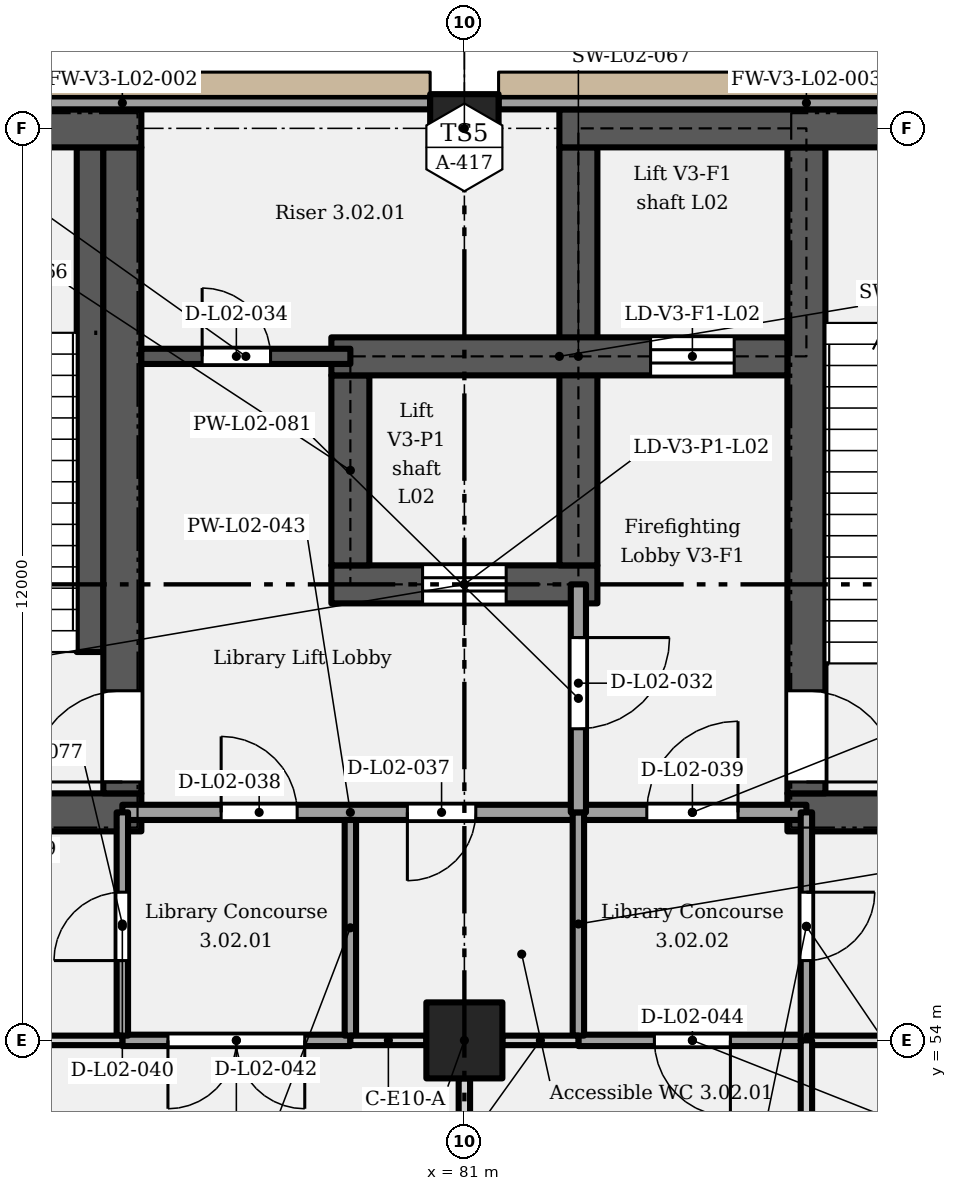
"""IFC4 building model, lengths in metres.
Left out: names, types, materials, properties, quantities, classifications, styles, units other than length and angle.
Written with IfcOpenShell. Run it as: python <this file> out.ifc"""

import sys

from ifc_helpers import new_model, si_unit, direction, frame, frame_2d, origin, origin_2d, place, context, subcontext, project, spatial, rectangle, extrude, element, fill, save


model = new_model("IFC4")
c1 = context("Model", 3, precision=1e-05, world=origin(), true_north=direction((0.0, 1.0)))
c2 = subcontext(c1, "Body", "Model", "MODEL_VIEW")
j1 = project(units=[si_unit("LENGTHUNIT", "METRE"), si_unit("PLANEANGLEUNIT", "RADIAN")], contexts=[c1])
p1 = place(None, origin())
s1 = spatial("IfcSite", under=j1, at=p1, CompositionType="ELEMENT")
p2 = place(p1, origin())
s2 = spatial("IfcBuilding", under=s1, at=p2, CompositionType="ELEMENT")
p3 = place(p2, frame((0.0, 0.0, 12.0)))
s3 = spatial("IfcBuildingStorey", under=s2, at=p3, CompositionType="ELEMENT", Elevation=12.0)
p4 = place(p3, frame((81.0, 54.0, 0.0), z_axis=(0.0, 0.0, 1.0), x_axis=(1.0, 0.0, 0.0)))
e1 = element("IfcColumn", 1, at=p4, inside=s3, PredefinedType="COLUMN", context=c2, shape_type="SweptSolid", body=[
    extrude(rectangle(XDim=1.0, YDim=1.0, at=origin_2d()), origin(), (0.0, 0.0, 1.0), 5.4),
])
p5 = place(p3, frame((81.0, 66.0, 0.0), z_axis=(0.0, 0.0, 1.0), x_axis=(1.0, 0.0, 0.0)))
e2 = element("IfcColumn", 2, at=p5, inside=s3, PredefinedType="COLUMN", context=c2, shape_type="SweptSolid", body=[
    extrude(rectangle(XDim=0.9, YDim=0.9, at=origin_2d()), origin(), (0.0, 0.0, 1.0), 5.4),
])
for number, where, z_axis, x_axis in (
    (3, (71.75, 57.0, 0.0), (0.0, 0.0, 1.0), (1.0, 0.0, 0.0)),
    (4, (85.25, 57.0, 0.0), (0.0, 0.0, 1.0), (1.0, 0.0, 0.0)),
):
    element("IfcWall", number, at=place(p3, frame(where, z_axis=z_axis, x_axis=x_axis)), inside=s3, PredefinedType="SHEAR", context=c2, shape_type="SweptSolid", body=[
        extrude(rectangle(XDim=5.0, YDim=0.5, at=frame_2d((2.5, 0.0))), origin(), (0.0, 0.0, 1.0), 5.15),
    ])
p6 = place(p3, frame((76.5, 57.25, 0.0), z_axis=(0.0, 0.0, 1.0), x_axis=(0.0, 1.0, 0.0)))
e5 = element("IfcWall", 5, at=p6, inside=s3, PredefinedType="SHEAR", context=c2, shape_type="SweptSolid", body=[
    extrude(rectangle(XDim=8.5, YDim=0.5, at=frame_2d((4.25, 0.0))), origin(), (0.0, 0.0, 1.0), 5.15),
])
p7 = place(p6, frame((0.15, 0.0, 0.0)))
e6 = element("IfcOpeningElement", 6, at=p7, cuts=e5, PredefinedType="OPENING", context=c2, shape_type="SweptSolid", body=[
    extrude(rectangle(XDim=1.2, YDim=2.1, at=frame_2d((0.6, 1.05))), frame((0.0, 0.26, 0.0), z_axis=(0.0, -1.0, 0.0), x_axis=(1.0, 0.0, 0.0)), (0.0, 0.0, 1.0), 0.52),
])
p8 = place(p3, frame((85.5, 57.25, 0.0), z_axis=(0.0, 0.0, 1.0), x_axis=(0.0, 1.0, 0.0)))
e7 = element("IfcWall", 7, at=p8, inside=s3, PredefinedType="SHEAR", context=c2, shape_type="SweptSolid", body=[
    extrude(rectangle(XDim=8.5, YDim=0.5, at=frame_2d((4.25, 0.0))), origin(), (0.0, 0.0, 1.0), 5.15),
])
p9 = place(p8, frame((1.35, 0.0, 0.0), z_axis=(0.0, 0.0, 1.0), x_axis=(-1.0, 0.0, 0.0)))
e8 = element("IfcOpeningElement", 8, at=p9, cuts=e7, PredefinedType="OPENING", context=c2, shape_type="SweptSolid", body=[
    extrude(rectangle(XDim=1.2, YDim=2.1, at=frame_2d((0.6, 1.05))), frame((0.0, 0.26, 0.0), z_axis=(0.0, -1.0, 0.0), x_axis=(1.0, 0.0, 0.0)), (0.0, 0.0, 1.0), 0.52),
])
p10 = place(p3, frame((79.25, 60.0, 0.0), z_axis=(0.0, 0.0, 1.0), x_axis=(1.0, 0.0, 0.0)))
e9 = element("IfcWall", 9, at=p10, inside=s3, PredefinedType="SHEAR", context=c2, shape_type="SweptSolid", body=[
    extrude(rectangle(XDim=3.5, YDim=0.5, at=frame_2d((1.75, 0.0))), origin(), (0.0, 0.0, 1.0), 5.15),
])
p11 = place(p10, frame((1.2, 0.0, 0.0)))
e10 = element("IfcOpeningElement", 10, at=p11, cuts=e9, PredefinedType="OPENING", context=c2, shape_type="SweptSolid", body=[
    extrude(rectangle(XDim=1.1, YDim=2.1, at=frame_2d((0.55, 1.05))), frame((0.0, 0.26, 0.0), z_axis=(0.0, -1.0, 0.0), x_axis=(1.0, 0.0, 0.0)), (0.0, 0.0, 1.0), 0.52),
])
p12 = place(p3, frame((79.5, 60.25, 0.0), z_axis=(0.0, 0.0, 1.0), x_axis=(0.0, 1.0, 0.0)))
e11 = element("IfcWall", 11, at=p12, inside=s3, PredefinedType="SHEAR", context=c2, shape_type="SweptSolid", body=[
    extrude(rectangle(XDim=2.5, YDim=0.5, at=frame_2d((1.25, 0.0))), origin(), (0.0, 0.0, 1.0), 5.15),
])
p13 = place(p3, frame((82.5, 60.25, 0.0), z_axis=(0.0, 0.0, 1.0), x_axis=(0.0, 1.0, 0.0)))
e12 = element("IfcWall", 12, at=p13, inside=s3, PredefinedType="SHEAR", context=c2, shape_type="SweptSolid", body=[
    extrude(rectangle(XDim=5.5, YDim=0.5, at=frame_2d((2.75, 0.0))), origin(), (0.0, 0.0, 1.0), 5.15),
])
p14 = place(p3, frame((79.25, 63.0, 0.0), z_axis=(0.0, 0.0, 1.0), x_axis=(1.0, 0.0, 0.0)))
e13 = element("IfcWall", 13, at=p14, inside=s3, PredefinedType="SHEAR", context=c2, shape_type="SweptSolid", body=[
    extrude(rectangle(XDim=6.0, YDim=0.5, at=frame_2d((3.0, 0.0))), origin(), (0.0, 0.0, 1.0), 5.15),
])
p15 = place(p14, frame((4.2, 0.0, 0.0)))
e14 = element("IfcOpeningElement", 14, at=p15, cuts=e13, PredefinedType="OPENING", context=c2, shape_type="SweptSolid", body=[
    extrude(rectangle(XDim=1.1, YDim=2.1, at=frame_2d((0.55, 1.05))), frame((0.0, 0.26, 0.0), z_axis=(0.0, -1.0, 0.0), x_axis=(1.0, 0.0, 0.0)), (0.0, 0.0, 1.0), 0.52),
])
p16 = place(p3, frame((72.45, 66.0, 0.0), z_axis=(0.0, 0.0, 1.0), x_axis=(1.0, 0.0, 0.0)))
e15 = element("IfcWall", 15, at=p16, inside=s3, PredefinedType="SHEAR", context=c2, shape_type="SweptSolid", body=[
    extrude(rectangle(XDim=4.3, YDim=0.5, at=frame_2d((2.15, 0.0))), origin(), (0.0, 0.0, 1.0), 5.15),
])
p17 = place(p3, frame((82.25, 66.0, 0.0), z_axis=(0.0, 0.0, 1.0), x_axis=(1.0, 0.0, 0.0)))
e16 = element("IfcWall", 16, at=p17, inside=s3, PredefinedType="SHEAR", context=c2, shape_type="SweptSolid", body=[
    extrude(rectangle(XDim=7.3, YDim=0.5, at=frame_2d((3.65, 0.0))), origin(), (0.0, 0.0, 1.0), 5.15),
])
for number, where, z_axis, x_axis in (
    (17, (72.45, 66.335, 0.0), (0.0, 0.0, 1.0), (1.0, 0.0, 0.0)),
    (18, (81.45, 66.335, 0.0), (0.0, 0.0, 1.0), (1.0, 0.0, 0.0)),
):
    element("IfcWall", number, at=place(p3, frame(where, z_axis=z_axis, x_axis=x_axis)), inside=s3, PredefinedType="SOLIDWALL", context=c2, shape_type="SweptSolid", body=[
        extrude(rectangle(XDim=8.1, YDim=0.17, at=frame_2d((4.05, 0.0))), origin(), (0.0, 0.0, 1.0), 5.15),
    ])
p18 = place(p3, frame((72.5, 54.0, 0.0), z_axis=(0.0, 0.0, 1.0), x_axis=(1.0, 0.0, 0.0)))
e19 = element("IfcWall", 19, at=p18, inside=s3, PredefinedType="PARTITIONING", context=c2, shape_type="SweptSolid", body=[
    extrude(rectangle(XDim=4.0, YDim=0.125, at=frame_2d((2.0, 0.0))), origin(), (0.0, 0.0, 1.0), 4.4),
])
p19 = place(p3, frame((76.5, 54.0, 0.0), z_axis=(0.0, 0.0, 1.0), x_axis=(1.0, 0.0, 0.0)))
e20 = element("IfcWall", 20, at=p19, inside=s3, PredefinedType="PARTITIONING", context=c2, shape_type="SweptSolid", body=[
    extrude(rectangle(XDim=3.0, YDim=0.15, at=frame_2d((1.5, 0.0))), origin(), (0.0, 0.0, 1.0), 4.4),
])
p20 = place(p19, frame((2.4, 0.0, 0.0), z_axis=(0.0, 0.0, 1.0), x_axis=(-1.0, 0.0, 0.0)))
e21 = element("IfcOpeningElement", 21, at=p20, cuts=e20, PredefinedType="OPENING", context=c2, shape_type="SweptSolid", body=[
    extrude(rectangle(XDim=1.8, YDim=2.4, at=frame_2d((0.9, 1.2))), frame((0.0, 0.085, 0.0), z_axis=(0.0, -1.0, 0.0), x_axis=(1.0, 0.0, 0.0)), (0.0, 0.0, 1.0), 0.17),
])
for number, where, z_axis, x_axis in (
    (22, (79.5, 54.0, 0.0), (0.0, 0.0, 1.0), (1.0, 0.0, 0.0)),
    (23, (81.5, 54.0, 0.0), (0.0, 0.0, 1.0), (1.0, 0.0, 0.0)),
):
    element("IfcWall", number, at=place(p3, frame(where, z_axis=z_axis, x_axis=x_axis)), inside=s3, PredefinedType="PARTITIONING", context=c2, shape_type="SweptSolid", body=[
        extrude(rectangle(XDim=1.0, YDim=0.125, at=frame_2d((0.5, 0.0))), origin(), (0.0, 0.0, 1.0), 4.4),
    ])
p21 = place(p3, frame((82.5, 54.0, 0.0), z_axis=(0.0, 0.0, 1.0), x_axis=(1.0, 0.0, 0.0)))
e24 = element("IfcWall", 24, at=p21, inside=s3, PredefinedType="PARTITIONING", context=c2, shape_type="SweptSolid", body=[
    extrude(rectangle(XDim=3.0, YDim=0.15, at=frame_2d((1.5, 0.0))), origin(), (0.0, 0.0, 1.0), 4.4),
])
p22 = place(p21, frame((2.0, 0.0, 0.0), z_axis=(0.0, 0.0, 1.0), x_axis=(-1.0, 0.0, 0.0)))
e25 = element("IfcOpeningElement", 25, at=p22, cuts=e24, PredefinedType="OPENING", context=c2, shape_type="SweptSolid", body=[
    extrude(rectangle(XDim=1.0, YDim=2.1, at=frame_2d((0.5, 1.05))), frame((0.0, 0.085, 0.0), z_axis=(0.0, -1.0, 0.0), x_axis=(1.0, 0.0, 0.0)), (0.0, 0.0, 1.0), 0.17),
])
p23 = place(p3, frame((85.5, 54.0, 0.0), z_axis=(0.0, 0.0, 1.0), x_axis=(1.0, 0.0, 0.0)))
e26 = element("IfcWall", 26, at=p23, inside=s3, PredefinedType="PARTITIONING", context=c2, shape_type="SweptSolid", body=[
    extrude(rectangle(XDim=4.05, YDim=0.125, at=frame_2d((2.025, 0.0))), origin(), (0.0, 0.0, 1.0), 4.4),
])
p24 = place(p3, frame((76.5, 57.0, 0.0), z_axis=(0.0, 0.0, 1.0), x_axis=(1.0, 0.0, 0.0)))
e27 = element("IfcWall", 27, at=p24, inside=s3, PredefinedType="PARTITIONING", context=c2, shape_type="SweptSolid", body=[
    extrude(rectangle(XDim=6.0, YDim=0.2, at=frame_2d((3.0, 0.0))), origin(), (0.0, 0.0, 1.0), 5.15),
])
p25 = place(p24, frame((4.65, 0.0, 0.0), z_axis=(0.0, 0.0, 1.0), x_axis=(-1.0, 0.0, 0.0)))
e28 = element("IfcOpeningElement", 28, at=p25, cuts=e27, PredefinedType="OPENING", context=c2, shape_type="SweptSolid", body=[
    extrude(rectangle(XDim=0.9, YDim=2.1, at=frame_2d((0.45, 1.05))), frame((0.0, 0.11, 0.0), z_axis=(0.0, -1.0, 0.0), x_axis=(1.0, 0.0, 0.0)), (0.0, 0.0, 1.0), 0.22),
])
p26 = place(p24, frame((1.3, 0.0, 0.0)))
e29 = element("IfcOpeningElement", 29, at=p26, cuts=e27, PredefinedType="OPENING", context=c2, shape_type="SweptSolid", body=[
    extrude(rectangle(XDim=1.0, YDim=2.1, at=frame_2d((0.5, 1.05))), frame((0.0, 0.11, 0.0), z_axis=(0.0, -1.0, 0.0), x_axis=(1.0, 0.0, 0.0)), (0.0, 0.0, 1.0), 0.22),
])
p27 = place(p3, frame((82.5, 57.0, 0.0), z_axis=(0.0, 0.0, 1.0), x_axis=(1.0, 0.0, 0.0)))
e30 = element("IfcWall", 30, at=p27, inside=s3, PredefinedType="PARTITIONING", context=c2, shape_type="SweptSolid", body=[
    extrude(rectangle(XDim=3.0, YDim=0.2, at=frame_2d((1.5, 0.0))), origin(), (0.0, 0.0, 1.0), 5.15),
])
p28 = place(p27, frame((0.9, 0.0, 0.0)))
e31 = element("IfcOpeningElement", 31, at=p28, cuts=e30, PredefinedType="OPENING", context=c2, shape_type="SweptSolid", body=[
    extrude(rectangle(XDim=1.2, YDim=2.1, at=frame_2d((0.6, 1.05))), frame((0.0, 0.11, 0.0), z_axis=(0.0, -1.0, 0.0), x_axis=(1.0, 0.0, 0.0)), (0.0, 0.0, 1.0), 0.22),
])
p29 = place(p3, frame((76.75, 63.0, 0.0), z_axis=(0.0, 0.0, 1.0), x_axis=(1.0, 0.0, 0.0)))
e32 = element("IfcWall", 32, at=p29, inside=s3, PredefinedType="SHEAR", context=c2, shape_type="SweptSolid", body=[
    extrude(rectangle(XDim=2.75, YDim=0.2, at=frame_2d((1.375, 0.0))), origin(), (0.0, 0.0, 1.0), 5.15),
])
p30 = place(p29, frame((0.8, 0.0, 0.0)))
e33 = element("IfcOpeningElement", 33, at=p30, cuts=e32, PredefinedType="OPENING", context=c2, shape_type="SweptSolid", body=[
    extrude(rectangle(XDim=0.9, YDim=2.0, at=frame_2d((0.45, 1.0))), frame((0.0, 0.11, 0.0), z_axis=(0.0, -1.0, 0.0), x_axis=(1.0, 0.0, 0.0)), (0.0, 0.0, 1.0), 0.22),
])
p31 = place(p3, frame((76.5, 54.062, 0.0), z_axis=(0.0, 0.0, 1.0), x_axis=(0.0, 1.0, 0.0)))
e34 = element("IfcWall", 34, at=p31, inside=s3, PredefinedType="PARTITIONING", context=c2, shape_type="SweptSolid", body=[
    extrude(rectangle(XDim=2.938, YDim=0.15, at=frame_2d((1.469, 0.0))), origin(), (0.0, 0.0, 1.0), 5.15),
])
p32 = place(p31, frame((0.988, 0.0, 0.0)))
e35 = element("IfcOpeningElement", 35, at=p32, cuts=e34, PredefinedType="OPENING", context=c2, shape_type="SweptSolid", body=[
    extrude(rectangle(XDim=0.9, YDim=2.1, at=frame_2d((0.45, 1.05))), frame((0.0, 0.085, 0.0), z_axis=(0.0, -1.0, 0.0), x_axis=(1.0, 0.0, 0.0)), (0.0, 0.0, 1.0), 0.17),
])
p33 = place(p3, frame((79.5, 54.062, 0.0), z_axis=(0.0, 0.0, 1.0), x_axis=(0.0, 1.0, 0.0)))
e36 = element("IfcWall", 36, at=p33, inside=s3, PredefinedType="PARTITIONING", context=c2, shape_type="SweptSolid", body=[
    extrude(rectangle(XDim=2.837, YDim=0.15, at=frame_2d((1.419, 0.0))), origin(), (0.0, 0.0, 1.0), 5.15),
])
p34 = place(p3, frame((81.0, 38.0, 0.0), z_axis=(0.0, 0.0, 1.0), x_axis=(0.0, 1.0, 0.0)))
e37 = element("IfcWall", 37, at=p34, inside=s3, PredefinedType="PARTITIONING", context=c2, shape_type="SweptSolid", body=[
    extrude(rectangle(XDim=15.5, YDim=0.15, at=frame_2d((7.75, 0.0))), origin(), (0.0, 0.0, 1.0), 4.2),
])
p35 = place(p3, frame((82.5, 54.062, 0.0), z_axis=(0.0, 0.0, 1.0), x_axis=(0.0, 1.0, 0.0)))
e38 = element("IfcWall", 38, at=p35, inside=s3, PredefinedType="PARTITIONING", context=c2, shape_type="SweptSolid", body=[
    extrude(rectangle(XDim=2.938, YDim=0.15, at=frame_2d((1.469, 0.0))), origin(), (0.0, 0.0, 1.0), 5.15),
])
p36 = place(p3, frame((82.5, 57.0, 0.0), z_axis=(0.0, 0.0, 1.0), x_axis=(0.0, 1.0, 0.0)))
e39 = element("IfcWall", 39, at=p36, inside=s3, PredefinedType="PARTITIONING", context=c2, shape_type="SweptSolid", body=[
    extrude(rectangle(XDim=3.0, YDim=0.2, at=frame_2d((1.5, 0.0))), origin(), (0.0, 0.0, 1.0), 5.15),
])
p37 = place(p36, frame((2.3, 0.0, 0.0), z_axis=(0.0, 0.0, 1.0), x_axis=(-1.0, 0.0, 0.0)))
e40 = element("IfcOpeningElement", 40, at=p37, cuts=e39, PredefinedType="OPENING", context=c2, shape_type="SweptSolid", body=[
    extrude(rectangle(XDim=1.2, YDim=2.1, at=frame_2d((0.6, 1.05))), frame((0.0, 0.11, 0.0), z_axis=(0.0, -1.0, 0.0), x_axis=(1.0, 0.0, 0.0)), (0.0, 0.0, 1.0), 0.22),
])
p38 = place(p3, frame((85.5, 49.575, 0.0), z_axis=(0.0, 0.0, 1.0), x_axis=(0.0, 1.0, 0.0)))
e41 = element("IfcWall", 41, at=p38, inside=s3, PredefinedType="PARTITIONING", context=c2, shape_type="SweptSolid", body=[
    extrude(rectangle(XDim=4.425, YDim=0.15, at=frame_2d((2.212, 0.0))), origin(), (0.0, 0.0, 1.0), 5.15),
])
p39 = place(p38, frame((2.625, 0.0, 0.0), z_axis=(0.0, 0.0, 1.0), x_axis=(-1.0, 0.0, 0.0)))
e42 = element("IfcOpeningElement", 42, at=p39, cuts=e41, PredefinedType="OPENING", context=c2, shape_type="SweptSolid", body=[
    extrude(rectangle(XDim=0.9, YDim=2.1, at=frame_2d((0.45, 1.05))), frame((0.0, 0.085, 0.0), z_axis=(0.0, -1.0, 0.0), x_axis=(1.0, 0.0, 0.0)), (0.0, 0.0, 1.0), 0.17),
])
p40 = place(p3, frame((85.5, 54.0, 0.0), z_axis=(0.0, 0.0, 1.0), x_axis=(0.0, 1.0, 0.0)))
e43 = element("IfcWall", 43, at=p40, inside=s3, PredefinedType="PARTITIONING", context=c2, shape_type="SweptSolid", body=[
    extrude(rectangle(XDim=3.0, YDim=0.15, at=frame_2d((1.5, 0.0))), origin(), (0.0, 0.0, 1.0), 5.15),
])
p41 = place(p40, frame((1.95, 0.0, 0.0), z_axis=(0.0, 0.0, 1.0), x_axis=(-1.0, 0.0, 0.0)))
e44 = element("IfcOpeningElement", 44, at=p41, cuts=e43, PredefinedType="OPENING", context=c2, shape_type="SweptSolid", body=[
    extrude(rectangle(XDim=0.9, YDim=2.1, at=frame_2d((0.45, 1.05))), frame((0.0, 0.085, 0.0), z_axis=(0.0, -1.0, 0.0), x_axis=(1.0, 0.0, 0.0)), (0.0, 0.0, 1.0), 0.17),
])
p42 = place(p3, frame((76.075, 59.11, 0.0), z_axis=(0.0, 0.0, 1.0), x_axis=(0.0, 1.0, 0.0)))
e45 = element("IfcWall", 45, at=p42, inside=s3, PredefinedType="SHEAR", context=c2, shape_type="SweptSolid", body=[
    extrude(rectangle(XDim=6.64, YDim=0.35, at=frame_2d((3.32, 0.0))), origin(), (0.0, 0.0, 1.0), 2.587),
])
p43 = place(p7, origin())
e46 = element("IfcDoor", 46, at=p43, inside=s3, OperationType="SINGLE_SWING_LEFT", PredefinedType="DOOR", context=c2, shape_type="SweptSolid", body=[
    extrude(rectangle(XDim=1.2, YDim=2.1, at=frame_2d((0.6, 1.05))), frame((0.0, 0.025, 0.0), z_axis=(0.0, -1.0, 0.0), x_axis=(1.0, 0.0, 0.0)), (0.0, 0.0, 1.0), 0.05),
])
fill(e6, e46)
p44 = place(p37, origin())
e47 = element("IfcDoor", 47, at=p44, inside=s3, OperationType="SINGLE_SWING_LEFT", PredefinedType="DOOR", context=c2, shape_type="SweptSolid", body=[
    extrude(rectangle(XDim=1.2, YDim=2.1, at=frame_2d((0.6, 1.05))), frame((0.0, 0.025, 0.0), z_axis=(0.0, -1.0, 0.0), x_axis=(1.0, 0.0, 0.0)), (0.0, 0.0, 1.0), 0.05),
])
fill(e40, e47)
p45 = place(p11, origin())
e48 = element("IfcDoor", 48, at=p45, inside=s3, OperationType="SLIDING_TO_LEFT", PredefinedType="DOOR", context=c2, shape_type="SweptSolid", body=[
    extrude(rectangle(XDim=1.1, YDim=2.1, at=frame_2d((0.55, 1.05))), frame((0.0, 0.025, 0.0), z_axis=(0.0, -1.0, 0.0), x_axis=(1.0, 0.0, 0.0)), (0.0, 0.0, 1.0), 0.05),
])
fill(e10, e48)
p46 = place(p30, origin())
e49 = element("IfcDoor", 49, at=p46, inside=s3, OperationType="SINGLE_SWING_LEFT", PredefinedType="DOOR", context=c2, shape_type="SweptSolid", body=[
    extrude(rectangle(XDim=0.9, YDim=2.0, at=frame_2d((0.45, 1.0))), frame((0.0, 0.025, 0.0), z_axis=(0.0, -1.0, 0.0), x_axis=(1.0, 0.0, 0.0)), (0.0, 0.0, 1.0), 0.05),
])
fill(e33, e49)
p47 = place(p15, origin())
e50 = element("IfcDoor", 50, at=p47, inside=s3, OperationType="SLIDING_TO_LEFT", PredefinedType="DOOR", context=c2, shape_type="SweptSolid", body=[
    extrude(rectangle(XDim=1.1, YDim=2.1, at=frame_2d((0.55, 1.05))), frame((0.0, 0.025, 0.0), z_axis=(0.0, -1.0, 0.0), x_axis=(1.0, 0.0, 0.0)), (0.0, 0.0, 1.0), 0.05),
])
fill(e14, e50)
p48 = place(p9, origin())
e51 = element("IfcDoor", 51, at=p48, inside=s3, OperationType="SINGLE_SWING_RIGHT", PredefinedType="DOOR", context=c2, shape_type="SweptSolid", body=[
    extrude(rectangle(XDim=1.2, YDim=2.1, at=frame_2d((0.6, 1.05))), frame((0.0, 0.025, 0.0), z_axis=(0.0, -1.0, 0.0), x_axis=(1.0, 0.0, 0.0)), (0.0, 0.0, 1.0), 0.05),
])
fill(e8, e51)
p49 = place(p25, origin())
e52 = element("IfcDoor", 52, at=p49, inside=s3, OperationType="SINGLE_SWING_RIGHT", PredefinedType="DOOR", context=c2, shape_type="SweptSolid", body=[
    extrude(rectangle(XDim=0.9, YDim=2.1, at=frame_2d((0.45, 1.05))), frame((0.0, 0.025, 0.0), z_axis=(0.0, -1.0, 0.0), x_axis=(1.0, 0.0, 0.0)), (0.0, 0.0, 1.0), 0.05),
])
fill(e28, e52)
p50 = place(p26, origin())
e53 = element("IfcDoor", 53, at=p50, inside=s3, OperationType="SINGLE_SWING_LEFT", PredefinedType="DOOR", context=c2, shape_type="SweptSolid", body=[
    extrude(rectangle(XDim=1.0, YDim=2.1, at=frame_2d((0.5, 1.05))), frame((0.0, 0.025, 0.0), z_axis=(0.0, -1.0, 0.0), x_axis=(1.0, 0.0, 0.0)), (0.0, 0.0, 1.0), 0.05),
])
fill(e29, e53)
p51 = place(p28, origin())
e54 = element("IfcDoor", 54, at=p51, inside=s3, OperationType="SINGLE_SWING_RIGHT", PredefinedType="DOOR", context=c2, shape_type="SweptSolid", body=[
    extrude(rectangle(XDim=1.2, YDim=2.1, at=frame_2d((0.6, 1.05))), frame((0.0, 0.025, 0.0), z_axis=(0.0, -1.0, 0.0), x_axis=(1.0, 0.0, 0.0)), (0.0, 0.0, 1.0), 0.05),
])
fill(e31, e54)
p52 = place(p32, origin())
e55 = element("IfcDoor", 55, at=p52, inside=s3, OperationType="SINGLE_SWING_LEFT", PredefinedType="DOOR", context=c2, shape_type="SweptSolid", body=[
    extrude(rectangle(XDim=0.9, YDim=2.1, at=frame_2d((0.45, 1.05))), frame((0.0, 0.025, 0.0), z_axis=(0.0, -1.0, 0.0), x_axis=(1.0, 0.0, 0.0)), (0.0, 0.0, 1.0), 0.05),
])
fill(e35, e55)
p53 = place(p41, origin())
e56 = element("IfcDoor", 56, at=p53, inside=s3, OperationType="SINGLE_SWING_LEFT", PredefinedType="DOOR", context=c2, shape_type="SweptSolid", body=[
    extrude(rectangle(XDim=0.9, YDim=2.1, at=frame_2d((0.45, 1.05))), frame((0.0, 0.025, 0.0), z_axis=(0.0, -1.0, 0.0), x_axis=(1.0, 0.0, 0.0)), (0.0, 0.0, 1.0), 0.05),
])
fill(e44, e56)
p54 = place(p20, origin())
e57 = element("IfcDoor", 57, at=p54, inside=s3, OperationType="DOUBLE_DOOR_SINGLE_SWING", PredefinedType="DOOR", context=c2, shape_type="SweptSolid", body=[
    extrude(rectangle(XDim=1.8, YDim=2.4, at=frame_2d((0.9, 1.2))), frame((0.0, 0.025, 0.0), z_axis=(0.0, -1.0, 0.0), x_axis=(1.0, 0.0, 0.0)), (0.0, 0.0, 1.0), 0.05),
])
fill(e21, e57)
p55 = place(p22, origin())
e58 = element("IfcDoor", 58, at=p55, inside=s3, OperationType="SINGLE_SWING_LEFT", PredefinedType="DOOR", context=c2, shape_type="SweptSolid", body=[
    extrude(rectangle(XDim=1.0, YDim=2.1, at=frame_2d((0.5, 1.05))), frame((0.0, 0.025, 0.0), z_axis=(0.0, -1.0, 0.0), x_axis=(1.0, 0.0, 0.0)), (0.0, 0.0, 1.0), 0.05),
])
fill(e25, e58)
save(model, sys.argv[1])
